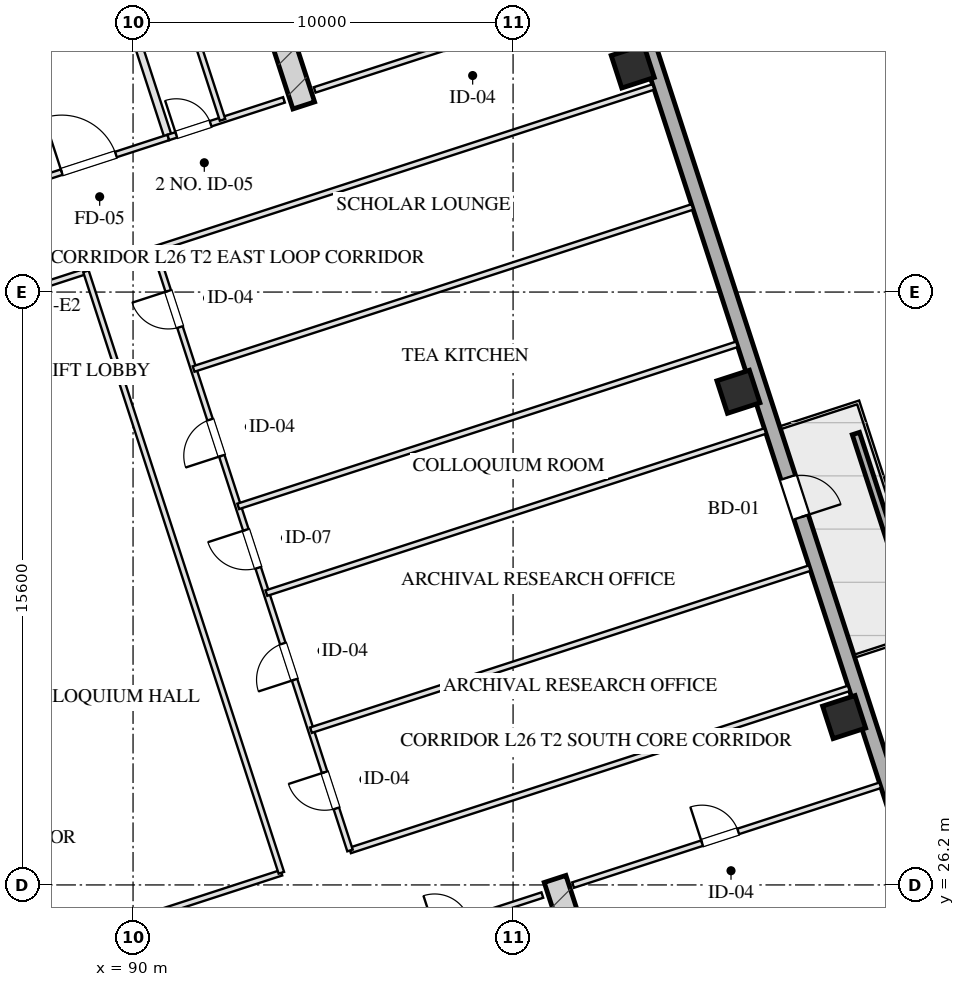
"""IFC4 building model, lengths in metres.
Left out: names, types, materials, properties, quantities, classifications, styles, units other than length and angle.
Written with IfcOpenShell. Run it as: python <this file> out.ifc"""

import sys

from ifc_helpers import new_model, si_unit, direction, frame, frame_2d, origin, origin_2d, place, context, subcontext, project, spatial, rectangle, hollow_rectangle, extrude, element, fill, save


model = new_model("IFC4")
c1 = context("Model", 3, precision=1e-05, world=origin(), true_north=direction((0.0, 1.0)))
c2 = subcontext(c1, "Body", "Model", "MODEL_VIEW")
j1 = project(units=[si_unit("LENGTHUNIT", "METRE"), si_unit("PLANEANGLEUNIT", "RADIAN")], contexts=[c1])
p1 = place(None, origin())
s1 = spatial("IfcSite", under=j1, at=p1, CompositionType="ELEMENT")
p2 = place(p1, origin())
s2 = spatial("IfcBuilding", under=s1, at=p2, CompositionType="ELEMENT")
p3 = place(p2, frame((0.0, 0.0, 103.5)))
s3 = spatial("IfcBuildingStorey", under=s2, at=p3, CompositionType="ELEMENT", Elevation=103.5)
for number, where, z_axis, x_axis in (
    (1, (101.105, 26.358, 0.0), (0.0, 0.0, 1.0), (0.309, -0.951, 0.0)),
    (2, (94.492, 46.71, 0.0), (0.0, 0.0, 1.0), (-0.309, 0.951, 0.0)),
):
    element("IfcWall", number, at=place(p3, frame(where, z_axis=z_axis, x_axis=x_axis)), inside=s3, PredefinedType="SHEAR", context=c2, shape_type="SweptSolid", body=[
        extrude(rectangle(XDim=9.48, YDim=0.6, at=frame_2d((4.74, 0.0))), origin(), (0.0, 0.0, 1.0), 3.45),
    ])
for number, where, z_axis, x_axis in (
    (3, (108.711, 30.616, 0.0), (0.0, 0.0, 1.0), (0.951, 0.309, 0.0)),
    (4, (105.93, 39.176, 0.0), (0.0, 0.0, 1.0), (0.951, 0.309, 0.0)),
    (5, (103.149, 47.736, 0.0), (0.0, 0.0, 1.0), (0.951, 0.309, 0.0)),
):
    element("IfcColumn", number, at=place(p3, frame(where, z_axis=z_axis, x_axis=x_axis)), inside=s3, PredefinedType="COLUMN", context=c2, shape_type="SweptSolid", body=[
        extrude(hollow_rectangle(XDim=0.9, YDim=0.9, WallThickness=0.032, at=origin_2d()), origin(), (0.0, 0.0, 1.0), 3.451),
    ])
p4 = place(p3, frame((99.284, 61.41, 0.0), z_axis=(0.0, 0.0, 1.0), x_axis=(0.309017542002, -0.95105633836, 0.0)))
e6 = element("IfcWall", 6, at=p4, inside=s3, PredefinedType="SOLIDWALL", context=c2, shape_type="SweptSolid", body=[
    extrude(rectangle(XDim=46.4, YDim=0.4, at=frame_2d((23.2, 0.0))), origin(), (0.0, 0.0, 1.0), 2.61),
])
p5 = place(p4, frame((25.746, 0.0, 0.0)))
e7 = element("IfcOpeningElement", 7, at=p5, cuts=e6, PredefinedType="OPENING", context=c2, shape_type="SweptSolid", body=[
    extrude(rectangle(XDim=1.1, YDim=2.15, at=frame_2d((0.55, 1.075))), frame((0.0, 0.21, 0.0), z_axis=(0.0, -1.0, 0.0), x_axis=(1.0, 0.0, 0.0)), (0.0, 0.0, 1.0), 0.42),
])
p6 = place(p3, frame((110.504, 33.512, 0.0), z_axis=(0.0, 0.0, 1.0), x_axis=(-0.308986014439, 0.951066581729, 0.0)))
e8 = element("IfcWall", 8, at=p6, inside=s3, PredefinedType="PARAPET", context=c2, shape_type="SweptSolid", body=[
    extrude(rectangle(XDim=4.8, YDim=0.2, at=frame_2d((2.4, 0.0))), origin(), (0.0, 0.0, 1.0), 0.75),
])
p7 = place(p3, frame((97.727, 24.944, 0.0), z_axis=(0.0, 0.0, 1.0), x_axis=(0.951036872128, 0.309077446369, 0.0)))
e9 = element("IfcWall", 9, at=p7, inside=s3, PredefinedType="PARTITIONING", context=c2, shape_type="SweptSolid", body=[
    extrude(rectangle(XDim=3.2, YDim=0.15, at=frame_2d((1.6, 0.0))), origin(), (0.0, 0.0, 1.0), 3.175),
])
p8 = place(p7, frame((0.22, 0.0, 0.0)))
e10 = element("IfcOpeningElement", 10, at=p8, cuts=e9, PredefinedType="OPENING", context=c2, shape_type="SweptSolid", body=[
    extrude(rectangle(XDim=0.95, YDim=2.05, at=frame_2d((0.475, 1.025))), frame((0.0, 0.085, 0.0), z_axis=(0.0, -1.0, 0.0), x_axis=(1.0, 0.0, 0.0)), (0.0, 0.0, 1.0), 0.17),
])
p9 = place(p3, frame((90.928, 45.868, 0.0), z_axis=(0.0, 0.0, 1.0), x_axis=(-0.309042196757, 0.951048327176, 0.0)))
e11 = element("IfcWall", 11, at=p9, inside=s3, PredefinedType="PARTITIONING", context=c2, shape_type="SweptSolid", body=[
    extrude(rectangle(XDim=8.43, YDim=0.2, at=frame_2d((4.215, 0.0))), origin(), (0.0, 0.0, 1.0), 3.175),
])
p10 = place(p3, frame((86.743, 44.508, 0.0), z_axis=(0.0, 0.0, 1.0), x_axis=(0.951063829732, 0.308994485023, 0.0)))
e12 = element("IfcWall", 12, at=p10, inside=s3, PredefinedType="PARTITIONING", context=c2, shape_type="SweptSolid", body=[
    extrude(rectangle(XDim=4.4, YDim=0.15, at=frame_2d((2.2, 0.0))), origin(), (0.0, 0.0, 1.0), 3.175),
])
p11 = place(p10, frame((1.45, 0.0, 0.0)))
e13 = element("IfcOpeningElement", 13, at=p11, cuts=e12, PredefinedType="OPENING", context=c2, shape_type="SweptSolid", body=[
    extrude(rectangle(XDim=1.5, YDim=2.05, at=frame_2d((0.75, 1.025))), frame((0.0, 0.085, 0.0), z_axis=(0.0, -1.0, 0.0), x_axis=(1.0, 0.0, 0.0)), (0.0, 0.0, 1.0), 0.17),
])
p12 = place(p3, frame((85.718, 47.666, 0.0), z_axis=(0.0, 0.0, 1.0), x_axis=(0.951058531764, 0.30901079133, 0.0)))
e14 = element("IfcWall", 14, at=p12, inside=s3, PredefinedType="PARTITIONING", context=c2, shape_type="SweptSolid", body=[
    extrude(rectangle(XDim=4.4, YDim=0.2, at=frame_2d((2.2, 0.0))), origin(), (0.0, 0.0, 1.0), 3.175),
])
p13 = place(p12, frame((0.45, 0.0, 0.0)))
e15 = element("IfcOpeningElement", 15, at=p13, cuts=e14, PredefinedType="OPENING", context=c2, shape_type="SweptSolid", body=[
    extrude(rectangle(XDim=1.1, YDim=2.05, at=frame_2d((0.55, 1.025))), frame((0.0, 0.11, 0.0), z_axis=(0.0, -1.0, 0.0), x_axis=(1.0, 0.0, 0.0)), (0.0, 0.0, 1.0), 0.22),
])
p14 = place(p12, frame((2.55, 0.0, 0.0)))
e16 = element("IfcOpeningElement", 16, at=p14, cuts=e14, PredefinedType="OPENING", context=c2, shape_type="SweptSolid", body=[
    extrude(rectangle(XDim=1.1, YDim=2.05, at=frame_2d((0.55, 1.025))), frame((0.0, 0.11, 0.0), z_axis=(0.0, -1.0, 0.0), x_axis=(1.0, 0.0, 0.0)), (0.0, 0.0, 1.0), 0.22),
])
p15 = place(p3, frame((90.928, 45.868, 0.0), z_axis=(0.0, 0.0, 1.0), x_axis=(0.951059297078, 0.309008435874, 0.0)))
e17 = element("IfcWall", 17, at=p15, inside=s3, PredefinedType="PARTITIONING", context=c2, shape_type="SweptSolid", body=[
    extrude(rectangle(XDim=3.2, YDim=0.15, at=frame_2d((1.6, 0.0))), origin(), (0.0, 0.0, 1.0), 3.175),
])
p16 = place(p15, frame((0.22, 0.0, 0.0)))
e18 = element("IfcOpeningElement", 18, at=p16, cuts=e17, PredefinedType="OPENING", context=c2, shape_type="SweptSolid", body=[
    extrude(rectangle(XDim=0.95, YDim=2.05, at=frame_2d((0.475, 1.025))), frame((0.0, 0.085, 0.0), z_axis=(0.0, -1.0, 0.0), x_axis=(1.0, 0.0, 0.0)), (0.0, 0.0, 1.0), 0.17),
])
p17 = place(p3, frame((92.355, 46.331, 0.0), z_axis=(0.0, 0.0, 1.0), x_axis=(-0.309007490203, 0.951059604335, 0.0)))
e19 = element("IfcWall", 19, at=p17, inside=s3, PredefinedType="PARTITIONING", context=c2, shape_type="SweptSolid", body=[
    extrude(rectangle(XDim=8.43, YDim=0.15, at=frame_2d((4.215, 0.0))), origin(), (0.0, 0.0, 1.0), 3.175),
])
p18 = place(p17, frame((2.55, 0.0, 0.0)))
e20 = element("IfcOpeningElement", 20, at=p18, cuts=e19, PredefinedType="OPENING", context=c2, shape_type="SweptSolid", body=[
    extrude(rectangle(XDim=0.95, YDim=2.05, at=frame_2d((0.475, 1.025))), frame((0.0, 0.085, 0.0), z_axis=(0.0, -1.0, 0.0), x_axis=(1.0, 0.0, 0.0)), (0.0, 0.0, 1.0), 0.17),
])
p19 = place(p17, frame((4.7, 0.0, 0.0)))
e21 = element("IfcOpeningElement", 21, at=p19, cuts=e19, PredefinedType="OPENING", context=c2, shape_type="SweptSolid", body=[
    extrude(rectangle(XDim=0.9, YDim=2.05, at=frame_2d((0.45, 1.025))), frame((0.0, 0.085, 0.0), z_axis=(0.0, -1.0, 0.0), x_axis=(1.0, 0.0, 0.0)), (0.0, 0.0, 1.0), 0.17),
])
p20 = place(p17, frame((6.8, 0.0, 0.0)))
e22 = element("IfcOpeningElement", 22, at=p20, cuts=e19, PredefinedType="OPENING", context=c2, shape_type="SweptSolid", body=[
    extrude(rectangle(XDim=0.9, YDim=2.05, at=frame_2d((0.45, 1.025))), frame((0.0, 0.085, 0.0), z_axis=(0.0, -1.0, 0.0), x_axis=(1.0, 0.0, 0.0)), (0.0, 0.0, 1.0), 0.17),
])
p21 = place(p3, frame((101.578, 26.196, 0.0), z_axis=(0.0, 0.0, 1.0), x_axis=(0.951062770994, 0.308997743729, 0.0)))
e23 = element("IfcWall", 23, at=p21, inside=s3, PredefinedType="PARTITIONING", context=c2, shape_type="SweptSolid", body=[
    extrude(rectangle(XDim=8.5, YDim=0.15, at=frame_2d((4.25, 0.0))), origin(), (0.0, 0.0, 1.0), 3.175),
])
p22 = place(p21, frame((3.57, 0.0, 0.0)))
e24 = element("IfcOpeningElement", 24, at=p22, cuts=e23, PredefinedType="OPENING", context=c2, shape_type="SweptSolid", body=[
    extrude(rectangle(XDim=1.0, YDim=2.05, at=frame_2d((0.5, 1.025))), frame((0.0, 0.085, 0.0), z_axis=(0.0, -1.0, 0.0), x_axis=(1.0, 0.0, 0.0)), (0.0, 0.0, 1.0), 0.17),
])
p23 = place(p3, frame((94.78, 47.119, 0.0), z_axis=(0.0, 0.0, 1.0), x_axis=(0.951054329824, 0.309023723562, 0.0)))
e25 = element("IfcWall", 25, at=p23, inside=s3, PredefinedType="PARTITIONING", context=c2, shape_type="SweptSolid", body=[
    extrude(rectangle(XDim=8.5, YDim=0.15, at=frame_2d((4.25, 0.0))), origin(), (0.0, 0.0, 1.0), 3.175),
])
p24 = place(p23, frame((3.57, 0.0, 0.0)))
e26 = element("IfcOpeningElement", 26, at=p24, cuts=e25, PredefinedType="OPENING", context=c2, shape_type="SweptSolid", body=[
    extrude(rectangle(XDim=1.0, YDim=2.05, at=frame_2d((0.5, 1.025))), frame((0.0, 0.085, 0.0), z_axis=(0.0, -1.0, 0.0), x_axis=(1.0, 0.0, 0.0)), (0.0, 0.0, 1.0), 0.17),
])
p25 = place(p3, frame((85.676, 23.847, 0.0), z_axis=(0.0, 0.0, 1.0), x_axis=(0.951063309554, 0.308996086091, 0.0)))
e27 = element("IfcWall", 27, at=p25, inside=s3, PredefinedType="PARTITIONING", context=c2, shape_type="SweptSolid", body=[
    extrude(rectangle(XDim=8.65, YDim=0.15, at=frame_2d((4.325, 0.0))), origin(), (0.0, 0.0, 1.0), 3.175),
])
p26 = place(p3, frame((95.709, 27.107, 0.0), z_axis=(0.0, 0.0, 1.0), x_axis=(0.951056688031, 0.309016465825, 0.0)))
e28 = element("IfcWall", 28, at=p26, inside=s3, PredefinedType="PARTITIONING", context=c2, shape_type="SweptSolid", body=[
    extrude(rectangle(XDim=13.8, YDim=0.15, at=frame_2d((6.9, 0.0))), origin(), (0.0, 0.0, 1.0), 3.175),
])
p27 = place(p3, frame((80.534, 39.672, 0.0), z_axis=(0.0, 0.0, 1.0), x_axis=(0.951052319652, 0.309029910015, 0.0)))
e29 = element("IfcWall", 29, at=p27, inside=s3, PredefinedType="PARTITIONING", context=c2, shape_type="SweptSolid", body=[
    extrude(rectangle(XDim=8.65, YDim=0.15, at=frame_2d((4.325, 0.0))), origin(), (0.0, 0.0, 1.0), 3.175),
])
p28 = place(p3, frame((90.567, 42.933, 0.0), z_axis=(0.0, 0.0, 1.0), x_axis=(0.951058377365, 0.309011266531, 0.0)))
e30 = element("IfcWall", 30, at=p28, inside=s3, PredefinedType="PARTITIONING", context=c2, shape_type="SweptSolid", body=[
    extrude(rectangle(XDim=13.8, YDim=0.15, at=frame_2d((6.9, 0.0))), origin(), (0.0, 0.0, 1.0), 3.175),
])
p29 = place(p3, frame((93.903, 26.52, 0.0), z_axis=(0.0, 0.0, 1.0), x_axis=(-0.30901773025, 0.951056277195, 0.0)))
e31 = element("IfcWall", 31, at=p29, inside=s3, PredefinedType="PARTITIONING", context=c2, shape_type="SweptSolid", body=[
    extrude(rectangle(XDim=16.64, YDim=0.15, at=frame_2d((8.32, 0.0))), origin(), (0.0, 0.0, 1.0), 3.175),
])
p30 = place(p3, frame((95.709, 27.107, 0.0), z_axis=(0.0, 0.0, 1.0), x_axis=(-0.30901773025, 0.951056277195, 0.0)))
e32 = element("IfcWall", 32, at=p30, inside=s3, PredefinedType="PARTITIONING", context=c2, shape_type="SweptSolid", body=[
    extrude(rectangle(XDim=16.64, YDim=0.15, at=frame_2d((8.32, 0.0))), origin(), (0.0, 0.0, 1.0), 3.175),
])
p31 = place(p30, frame((1.164, 0.0, 0.0)))
e33 = element("IfcOpeningElement", 33, at=p31, cuts=e32, PredefinedType="OPENING", context=c2, shape_type="SweptSolid", body=[
    extrude(rectangle(XDim=1.0, YDim=2.05, at=frame_2d((0.5, 1.025))), frame((0.0, 0.085, 0.0), z_axis=(0.0, -1.0, 0.0), x_axis=(1.0, 0.0, 0.0)), (0.0, 0.0, 1.0), 0.17),
])
p32 = place(p30, frame((4.724, 0.0, 0.0)))
e34 = element("IfcOpeningElement", 34, at=p32, cuts=e32, PredefinedType="OPENING", context=c2, shape_type="SweptSolid", body=[
    extrude(rectangle(XDim=1.0, YDim=2.05, at=frame_2d((0.5, 1.025))), frame((0.0, 0.085, 0.0), z_axis=(0.0, -1.0, 0.0), x_axis=(1.0, 0.0, 0.0)), (0.0, 0.0, 1.0), 0.17),
])
p33 = place(p30, frame((7.82, 0.0, 0.0)))
e35 = element("IfcOpeningElement", 35, at=p33, cuts=e32, PredefinedType="OPENING", context=c2, shape_type="SweptSolid", body=[
    extrude(rectangle(XDim=1.05, YDim=2.05, at=frame_2d((0.525, 1.025))), frame((0.0, 0.085, 0.0), z_axis=(0.0, -1.0, 0.0), x_axis=(1.0, 0.0, 0.0)), (0.0, 0.0, 1.0), 0.17),
])
p34 = place(p30, frame((10.92, 0.0, 0.0)))
e36 = element("IfcOpeningElement", 36, at=p34, cuts=e32, PredefinedType="OPENING", context=c2, shape_type="SweptSolid", body=[
    extrude(rectangle(XDim=1.0, YDim=2.05, at=frame_2d((0.5, 1.025))), frame((0.0, 0.085, 0.0), z_axis=(0.0, -1.0, 0.0), x_axis=(1.0, 0.0, 0.0)), (0.0, 0.0, 1.0), 0.17),
])
p35 = place(p30, frame((14.48, 0.0, 0.0)))
e37 = element("IfcOpeningElement", 37, at=p35, cuts=e32, PredefinedType="OPENING", context=c2, shape_type="SweptSolid", body=[
    extrude(rectangle(XDim=1.0, YDim=2.05, at=frame_2d((0.5, 1.025))), frame((0.0, 0.085, 0.0), z_axis=(0.0, -1.0, 0.0), x_axis=(1.0, 0.0, 0.0)), (0.0, 0.0, 1.0), 0.17),
])
p36 = place(p3, frame((94.681, 30.272, 0.0), z_axis=(0.0, 0.0, 1.0), x_axis=(0.951051488548, 0.309032467762, 0.0)))
e38 = element("IfcWall", 38, at=p36, inside=s3, PredefinedType="PARTITIONING", context=c2, shape_type="SweptSolid", body=[
    extrude(rectangle(XDim=13.8, YDim=0.15, at=frame_2d((6.9, 0.0))), origin(), (0.0, 0.0, 1.0), 3.175),
])
p37 = place(p3, frame((93.509, 33.878, 0.0), z_axis=(0.0, 0.0, 1.0), x_axis=(0.951056688031, 0.309016465825, 0.0)))
e39 = element("IfcWall", 39, at=p37, inside=s3, PredefinedType="PARTITIONING", context=c2, shape_type="SweptSolid", body=[
    extrude(rectangle(XDim=13.8, YDim=0.15, at=frame_2d((6.9, 0.0))), origin(), (0.0, 0.0, 1.0), 3.175),
])
p38 = place(p3, frame((92.768, 36.161, 0.0), z_axis=(0.0, 0.0, 1.0), x_axis=(0.951058377365, 0.309011266531, 0.0)))
e40 = element("IfcWall", 40, at=p38, inside=s3, PredefinedType="PARTITIONING", context=c2, shape_type="SweptSolid", body=[
    extrude(rectangle(XDim=13.8, YDim=0.15, at=frame_2d((6.9, 0.0))), origin(), (0.0, 0.0, 1.0), 3.175),
])
p39 = place(p3, frame((91.594, 39.775, 0.0), z_axis=(0.0, 0.0, 1.0), x_axis=(0.951056688031, 0.309016465825, 0.0)))
e41 = element("IfcWall", 41, at=p39, inside=s3, PredefinedType="PARTITIONING", context=c2, shape_type="SweptSolid", body=[
    extrude(rectangle(XDim=13.8, YDim=0.15, at=frame_2d((6.9, 0.0))), origin(), (0.0, 0.0, 1.0), 3.175),
])
p40 = place(p5, origin())
e42 = element("IfcDoor", 42, at=p40, inside=s3, OperationType="SINGLE_SWING_RIGHT", PredefinedType="DOOR", context=c2, shape_type="SweptSolid", body=[
    extrude(rectangle(XDim=1.1, YDim=2.15, at=frame_2d((0.55, 1.075))), frame((0.0, 0.025, 0.0), z_axis=(0.0, -1.0, 0.0), x_axis=(1.0, 0.0, 0.0)), (0.0, 0.0, 1.0), 0.05),
])
fill(e7, e42)
p41 = place(p11, origin())
e43 = element("IfcDoor", 43, at=p41, inside=s3, OperationType="SINGLE_SWING_LEFT", PredefinedType="DOOR", context=c2, shape_type="SweptSolid", body=[
    extrude(rectangle(XDim=1.5, YDim=2.05, at=frame_2d((0.75, 1.025))), frame((0.0, 0.025, 0.0), z_axis=(0.0, -1.0, 0.0), x_axis=(1.0, 0.0, 0.0)), (0.0, 0.0, 1.0), 0.05),
])
fill(e13, e43)
p42 = place(p16, origin())
e44 = element("IfcDoor", 44, at=p42, inside=s3, OperationType="SINGLE_SWING_LEFT", PredefinedType="DOOR", context=c2, shape_type="SweptSolid", body=[
    extrude(rectangle(XDim=0.95, YDim=2.05, at=frame_2d((0.475, 1.025))), frame((0.0, 0.025, 0.0), z_axis=(0.0, -1.0, 0.0), x_axis=(1.0, 0.0, 0.0)), (0.0, 0.0, 1.0), 0.05),
])
fill(e18, e44)
p43 = place(p22, origin())
e45 = element("IfcDoor", 45, at=p43, inside=s3, OperationType="SINGLE_SWING_LEFT", PredefinedType="DOOR", context=c2, shape_type="SweptSolid", body=[
    extrude(rectangle(XDim=1.0, YDim=2.05, at=frame_2d((0.5, 1.025))), frame((0.0, 0.025, 0.0), z_axis=(0.0, -1.0, 0.0), x_axis=(1.0, 0.0, 0.0)), (0.0, 0.0, 1.0), 0.05),
])
fill(e24, e45)
p44 = place(p31, origin())
e46 = element("IfcDoor", 46, at=p44, inside=s3, OperationType="SINGLE_SWING_RIGHT", PredefinedType="DOOR", context=c2, shape_type="SweptSolid", body=[
    extrude(rectangle(XDim=1.0, YDim=2.05, at=frame_2d((0.5, 1.025))), frame((0.0, 0.025, 0.0), z_axis=(0.0, -1.0, 0.0), x_axis=(1.0, 0.0, 0.0)), (0.0, 0.0, 1.0), 0.05),
])
fill(e33, e46)
p45 = place(p32, origin())
e47 = element("IfcDoor", 47, at=p45, inside=s3, OperationType="SINGLE_SWING_LEFT", PredefinedType="DOOR", context=c2, shape_type="SweptSolid", body=[
    extrude(rectangle(XDim=1.0, YDim=2.05, at=frame_2d((0.5, 1.025))), frame((0.0, 0.025, 0.0), z_axis=(0.0, -1.0, 0.0), x_axis=(1.0, 0.0, 0.0)), (0.0, 0.0, 1.0), 0.05),
])
fill(e34, e47)
p46 = place(p33, origin())
e48 = element("IfcDoor", 48, at=p46, inside=s3, OperationType="SINGLE_SWING_RIGHT", PredefinedType="DOOR", context=c2, shape_type="SweptSolid", body=[
    extrude(rectangle(XDim=1.05, YDim=2.05, at=frame_2d((0.525, 1.025))), frame((0.0, 0.025, 0.0), z_axis=(0.0, -1.0, 0.0), x_axis=(1.0, 0.0, 0.0)), (0.0, 0.0, 1.0), 0.05),
])
fill(e35, e48)
p47 = place(p34, origin())
e49 = element("IfcDoor", 49, at=p47, inside=s3, OperationType="SINGLE_SWING_LEFT", PredefinedType="DOOR", context=c2, shape_type="SweptSolid", body=[
    extrude(rectangle(XDim=1.0, YDim=2.05, at=frame_2d((0.5, 1.025))), frame((0.0, 0.025, 0.0), z_axis=(0.0, -1.0, 0.0), x_axis=(1.0, 0.0, 0.0)), (0.0, 0.0, 1.0), 0.05),
])
fill(e36, e49)
p48 = place(p35, origin())
e50 = element("IfcDoor", 50, at=p48, inside=s3, OperationType="SINGLE_SWING_RIGHT", PredefinedType="DOOR", context=c2, shape_type="SweptSolid", body=[
    extrude(rectangle(XDim=1.0, YDim=2.05, at=frame_2d((0.5, 1.025))), frame((0.0, 0.025, 0.0), z_axis=(0.0, -1.0, 0.0), x_axis=(1.0, 0.0, 0.0)), (0.0, 0.0, 1.0), 0.05),
])
fill(e37, e50)
save(model, sys.argv[1])
